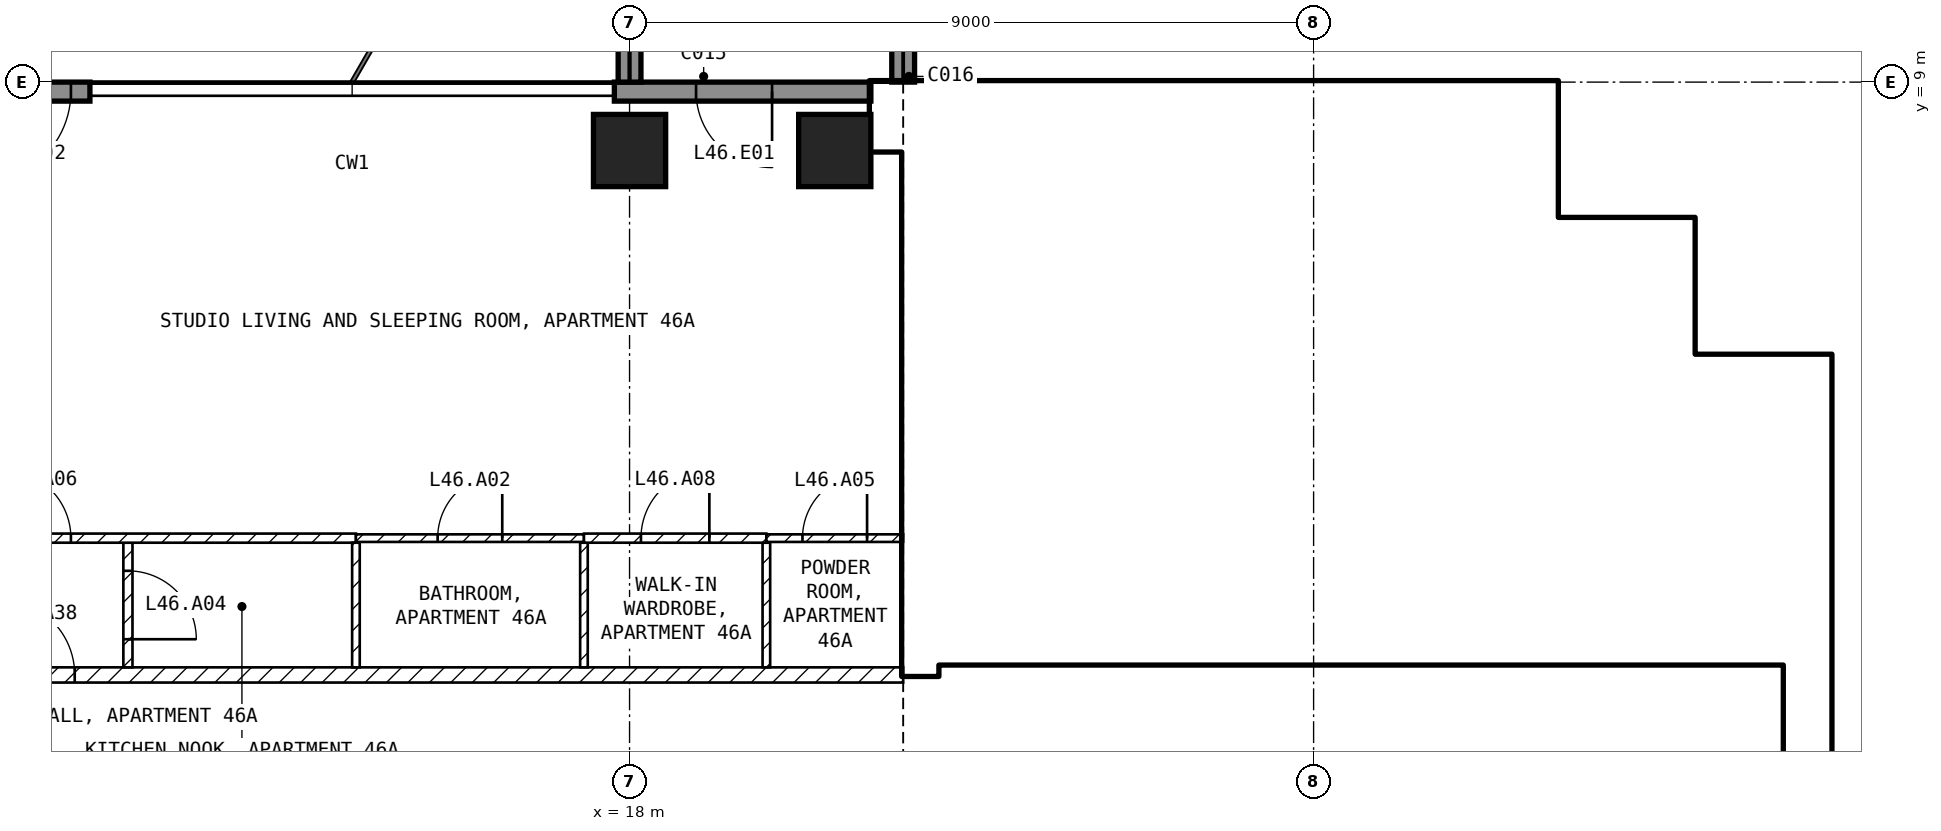
"""IFC4 building model, lengths in metres.
Left out: names, types, materials, properties, quantities, classifications, styles, units other than length and angle.
Written with IfcOpenShell. Run it as: python <this file> out.ifc"""

import sys

from ifc_helpers import new_model, si_unit, direction, frame, frame_2d, origin, origin_2d, place, context, subcontext, project, spatial, rectangle, extrude, element, fill, save


model = new_model("IFC4")
c1 = context("Model", 3, precision=1e-05, world=origin(), true_north=direction((0.0, 1.0)))
c2 = subcontext(c1, "Body", "Model", "MODEL_VIEW")
j1 = project(units=[si_unit("LENGTHUNIT", "METRE"), si_unit("PLANEANGLEUNIT", "RADIAN")], contexts=[c1])
p1 = place(None, origin())
s1 = spatial("IfcSite", under=j1, at=p1, CompositionType="ELEMENT")
p2 = place(p1, origin())
s2 = spatial("IfcBuilding", under=s1, at=p2, CompositionType="ELEMENT")
p3 = place(p2, frame((0.0, 0.0, 187.6)))
s3 = spatial("IfcBuildingStorey", under=s2, at=p3, CompositionType="ELEMENT", Elevation=187.6)
for number, where, z_axis, x_axis in (
    (1, (18.0, 8.1, -0.25), (0.0, 0.0, 1.0), (1.0, 0.0, 0.0)),
    (2, (20.7, 8.1, -0.25), (0.0, 0.0, 1.0), (1.0, 0.0, 0.0)),
):
    element("IfcColumn", number, at=place(p3, frame(where, z_axis=z_axis, x_axis=x_axis)), inside=s3, PredefinedType="COLUMN", context=c2, shape_type="SweptSolid", body=[
        extrude(rectangle(XDim=0.95, YDim=0.95, at=origin_2d()), origin(), (0.0, 0.0, 1.0), 3.5),
    ])
p4 = place(p3, frame((21.175, 8.875, 0.0), z_axis=(0.0, 0.0, 1.0), x_axis=(-1.0, 0.0, 0.0)))
e3 = element("IfcWall", 3, at=p4, inside=s3, PredefinedType="SOLIDWALL", context=c2, shape_type="SweptSolid", body=[
    extrude(rectangle(XDim=3.375, YDim=0.25, at=frame_2d((1.688, 0.0))), origin(), (0.0, 0.0, 1.0), 3.25),
])
p5 = place(p4, frame((1.3, 0.0, 0.0)))
e4 = element("IfcOpeningElement", 4, at=p5, cuts=e3, PredefinedType="OPENING", context=c2, shape_type="SweptSolid", body=[
    extrude(rectangle(XDim=1.0, YDim=2.4, at=frame_2d((0.5, 1.2))), frame((0.0, 0.135, 0.0), z_axis=(0.0, -1.0, 0.0), x_axis=(1.0, 0.0, 0.0)), (0.0, 0.0, 1.0), 0.27),
])
p6 = place(p3, frame((10.9, 8.875, 0.0), z_axis=(0.0, 0.0, 1.0), x_axis=(-1.0, 0.0, 0.0)))
e5 = element("IfcWall", 5, at=p6, inside=s3, PredefinedType="SOLIDWALL", context=c2, shape_type="SweptSolid", body=[
    extrude(rectangle(XDim=1.84, YDim=0.25, at=frame_2d((0.92, 0.0))), origin(), (0.0, 0.0, 1.0), 3.25),
])
p7 = place(p6, frame((0.25, 0.0, 0.0)))
e6 = element("IfcOpeningElement", 6, at=p7, cuts=e5, PredefinedType="OPENING", context=c2, shape_type="SweptSolid", body=[
    extrude(rectangle(XDim=1.2, YDim=2.4, at=frame_2d((0.6, 1.2))), frame((0.0, 0.135, 0.0), z_axis=(0.0, -1.0, 0.0), x_axis=(1.0, 0.0, 0.0)), (0.0, 0.0, 1.0), 0.27),
])
for number, where, z_axis, x_axis in (
    (7, (18.0, 9.0, 0.0), (0.0, 0.0, 1.0), (0.0, 1.0, 0.0)),
    (8, (21.6, 9.0, 0.0), (0.0, 0.0, 1.0), (0.0, 1.0, 0.0)),
):
    element("IfcWall", number, at=place(p3, frame(where, z_axis=z_axis, x_axis=x_axis)), inside=s3, PredefinedType="SOLIDWALL", context=c2, shape_type="SweptSolid", body=[
        extrude(rectangle(XDim=2.7, YDim=0.3, at=frame_2d((1.35, 0.0))), origin(), (0.0, 0.0, 1.0), 3.25),
    ])
p8 = place(p3, frame((33.5, -4.8, 0.0), z_axis=(0.0, 0.0, 1.0), x_axis=(0.0, 1.0, 0.0)))
e9 = element("IfcWall", 9, at=p8, inside=s3, PredefinedType="SHEAR", context=c2, shape_type="SweptSolid", body=[
    extrude(rectangle(XDim=10.2, YDim=0.6, at=frame_2d((5.1, 0.0))), origin(), (0.0, 0.0, 1.0), 3.25),
])
for number, where, z_axis, x_axis in (
    (10, (31.4, 5.1, 0.0), (0.0, 0.0, 1.0), (1.0, 0.0, 0.0)),
    (11, (31.7, 5.4, 0.0), (0.0, 0.0, 1.0), (0.0, 1.0, 0.0)),
):
    element("IfcWall", number, at=place(p3, frame(where, z_axis=z_axis, x_axis=x_axis)), inside=s3, PredefinedType="SHEAR", context=c2, shape_type="SweptSolid", body=[
        extrude(rectangle(XDim=1.8, YDim=0.6, at=frame_2d((0.9, 0.0))), origin(), (0.0, 0.0, 1.0), 3.25),
    ])
p9 = place(p3, frame((29.6, 6.9, 0.0), z_axis=(0.0, 0.0, 1.0), x_axis=(1.0, 0.0, 0.0)))
e12 = element("IfcWall", 12, at=p9, inside=s3, PredefinedType="SHEAR", context=c2, shape_type="SweptSolid", body=[
    extrude(rectangle(XDim=1.8, YDim=0.6, at=frame_2d((0.9, 0.0))), origin(), (0.0, 0.0, 1.0), 3.25),
])
p10 = place(p3, frame((29.9, 7.2, 0.0), z_axis=(0.0, 0.0, 1.0), x_axis=(0.0, 1.0, 0.0)))
e13 = element("IfcWall", 13, at=p10, inside=s3, PredefinedType="SHEAR", context=c2, shape_type="SweptSolid", body=[
    extrude(rectangle(XDim=1.8, YDim=0.6, at=frame_2d((0.9, 0.0))), origin(), (0.0, 0.0, 1.0), 3.25),
])
p11 = place(p3, frame((21.175, 8.55, 0.0), z_axis=(0.0, 0.0, 1.0), x_axis=(1.0, 0.0, 0.0)))
e14 = element("IfcWall", 14, at=p11, inside=s3, PredefinedType="SHEAR", context=c2, shape_type="SweptSolid", body=[
    extrude(rectangle(XDim=8.425, YDim=0.9, at=frame_2d((4.212, 0.0))), origin(), (0.0, 0.0, 1.0), 3.25),
])
p12 = place(p3, frame((21.825, 1.2, 0.0), z_axis=(0.0, 0.0, 1.0), x_axis=(0.0, 1.0, 0.0)))
e15 = element("IfcWall", 15, at=p12, inside=s3, PredefinedType="SHEAR", context=c2, shape_type="SweptSolid", body=[
    extrude(rectangle(XDim=6.9, YDim=0.45, at=frame_2d((3.45, 0.0))), origin(), (0.0, 0.0, 1.0), 3.25),
])
p13 = place(p3, frame((22.05, 1.45, 0.0), z_axis=(0.0, 0.0, 1.0), x_axis=(1.0, 0.0, 0.0)))
e16 = element("IfcWall", 16, at=p13, inside=s3, PredefinedType="SOLIDWALL", context=c2, shape_type="SweptSolid", body=[
    extrude(rectangle(XDim=11.15, YDim=0.2, at=frame_2d((5.575, 0.0))), origin(), (0.0, 0.0, 1.0), 3.25),
])
p14 = place(p13, frame((0.75, 0.0, 0.0)))
e17 = element("IfcOpeningElement", 17, at=p14, cuts=e16, PredefinedType="OPENING", context=c2, shape_type="SweptSolid", body=[
    extrude(rectangle(XDim=1.0, YDim=2.1, at=frame_2d((0.5, 1.05))), frame((0.0, 0.11, 0.0), z_axis=(0.0, -1.0, 0.0), x_axis=(1.0, 0.0, 0.0)), (0.0, 0.0, 1.0), 0.22),
])
p15 = place(p13, frame((3.25, 0.0, 0.0)))
e18 = element("IfcOpeningElement", 18, at=p15, cuts=e16, PredefinedType="OPENING", context=c2, shape_type="SweptSolid", body=[
    extrude(rectangle(XDim=1.0, YDim=2.1, at=frame_2d((0.5, 1.05))), frame((0.0, 0.11, 0.0), z_axis=(0.0, -1.0, 0.0), x_axis=(1.0, 0.0, 0.0)), (0.0, 0.0, 1.0), 0.22),
])
p16 = place(p13, frame((9.15, 0.0, 0.0)))
e19 = element("IfcOpeningElement", 19, at=p16, cuts=e16, PredefinedType="OPENING", context=c2, shape_type="SweptSolid", body=[
    extrude(rectangle(XDim=0.9, YDim=2.1, at=frame_2d((0.45, 1.05))), frame((0.0, 0.11, 0.0), z_axis=(0.0, -1.0, 0.0), x_axis=(1.0, 0.0, 0.0)), (0.0, 0.0, 1.0), 0.22),
])
p17 = place(p3, frame((22.05, 5.15, 0.0), z_axis=(0.0, 0.0, 1.0), x_axis=(1.0, 0.0, 0.0)))
e20 = element("IfcWall", 20, at=p17, inside=s3, PredefinedType="SOLIDWALL", context=c2, shape_type="SweptSolid", body=[
    extrude(rectangle(XDim=6.3, YDim=0.2, at=frame_2d((3.15, 0.0))), origin(), (0.0, 0.0, 1.0), 3.25),
])
p18 = place(p17, frame((0.2, 0.0, 0.0)))
e21 = element("IfcOpeningElement", 21, at=p18, cuts=e20, PredefinedType="OPENING", context=c2, shape_type="SweptSolid", body=[
    extrude(rectangle(XDim=1.0, YDim=2.1, at=frame_2d((0.5, 1.05))), frame((0.0, 0.11, 0.0), z_axis=(0.0, -1.0, 0.0), x_axis=(1.0, 0.0, 0.0)), (0.0, 0.0, 1.0), 0.22),
])
p19 = place(p3, frame((28.25, 5.25, 0.0), z_axis=(0.0, 0.0, 1.0), x_axis=(0.0, 1.0, 0.0)))
e22 = element("IfcWall", 22, at=p19, inside=s3, PredefinedType="SOLIDWALL", context=c2, shape_type="SweptSolid", body=[
    extrude(rectangle(XDim=2.85, YDim=0.2, at=frame_2d((1.425, 0.0))), origin(), (0.0, 0.0, 1.0), 3.25),
])
p20 = place(p3, frame((27.2, 3.95, 0.0), z_axis=(0.0, 0.0, 1.0), x_axis=(1.0, 0.0, 0.0)))
e23 = element("IfcWall", 23, at=p20, inside=s3, PredefinedType="SOLIDWALL", context=c2, shape_type="SweptSolid", body=[
    extrude(rectangle(XDim=6.0, YDim=0.2, at=frame_2d((3.0, 0.0))), origin(), (0.0, 0.0, 1.0), 3.25),
])
p21 = place(p3, frame((27.1, 1.55, 0.0), z_axis=(0.0, 0.0, 1.0), x_axis=(0.0, 1.0, 0.0)))
e24 = element("IfcWall", 24, at=p21, inside=s3, PredefinedType="SOLIDWALL", context=c2, shape_type="SweptSolid", body=[
    extrude(rectangle(XDim=3.5, YDim=0.2, at=frame_2d((1.75, 0.0))), origin(), (0.0, 0.0, 1.0), 3.25),
])
p22 = place(p21, frame((0.6, 0.0, 0.0)))
e25 = element("IfcOpeningElement", 25, at=p22, cuts=e24, PredefinedType="OPENING", context=c2, shape_type="SweptSolid", body=[
    extrude(rectangle(XDim=1.1, YDim=2.1, at=frame_2d((0.55, 1.05))), frame((0.0, 0.11, 0.0), z_axis=(0.0, -1.0, 0.0), x_axis=(1.0, 0.0, 0.0)), (0.0, 0.0, 1.0), 0.22),
])
p23 = place(p21, frame((2.6, 0.0, 0.0)))
e26 = element("IfcOpeningElement", 26, at=p23, cuts=e24, PredefinedType="OPENING", context=c2, shape_type="SweptSolid", body=[
    extrude(rectangle(XDim=0.8, YDim=2.1, at=frame_2d((0.4, 1.05))), frame((0.0, 0.11, 0.0), z_axis=(0.0, -1.0, 0.0), x_axis=(1.0, 0.0, 0.0)), (0.0, 0.0, 1.0), 0.22),
])
p24 = place(p3, frame((30.0, 1.55, 0.0), z_axis=(0.0, 0.0, 1.0), x_axis=(0.0, 1.0, 0.0)))
e27 = element("IfcWall", 27, at=p24, inside=s3, PredefinedType="SOLIDWALL", context=c2, shape_type="SweptSolid", body=[
    extrude(rectangle(XDim=2.3, YDim=0.2, at=frame_2d((1.15, 0.0))), origin(), (0.0, 0.0, 1.0), 3.25),
])
p25 = place(p3, frame((4.4, 1.2, 0.0), z_axis=(0.0, 0.0, 1.0), x_axis=(1.0, 0.0, 0.0)))
e28 = element("IfcWall", 28, at=p25, inside=s3, PredefinedType="PARTITIONING", context=c2, shape_type="SweptSolid", body=[
    extrude(rectangle(XDim=17.2, YDim=0.2, at=frame_2d((8.6, 0.0))), origin(), (0.0, 0.0, 1.0), 3.25),
])
p26 = place(p25, frame((5.3, 0.0, 0.0)))
e29 = element("IfcOpeningElement", 29, at=p26, cuts=e28, PredefinedType="OPENING", context=c2, shape_type="SweptSolid", body=[
    extrude(rectangle(XDim=1.0, YDim=2.1, at=frame_2d((0.5, 1.05))), frame((0.0, 0.11, 0.0), z_axis=(0.0, -1.0, 0.0), x_axis=(1.0, 0.0, 0.0)), (0.0, 0.0, 1.0), 0.22),
])
p27 = place(p3, frame((11.4, 2.94, 0.0), z_axis=(0.0, 0.0, 1.0), x_axis=(0.0, -1.0, 0.0)))
e30 = element("IfcWall", 30, at=p27, inside=s3, PredefinedType="PARTITIONING", context=c2, shape_type="SweptSolid", body=[
    extrude(rectangle(XDim=1.64, YDim=0.12, at=frame_2d((0.82, 0.0))), origin(), (0.0, 0.0, 1.0), 3.25),
])
p28 = place(p27, frame((0.37, 0.0, 0.0)))
e31 = element("IfcOpeningElement", 31, at=p28, cuts=e30, PredefinedType="OPENING", context=c2, shape_type="SweptSolid", body=[
    extrude(rectangle(XDim=0.9, YDim=2.1, at=frame_2d((0.45, 1.05))), frame((0.0, 0.07, 0.0), z_axis=(0.0, -1.0, 0.0), x_axis=(1.0, 0.0, 0.0)), (0.0, 0.0, 1.0), 0.14),
])
p29 = place(p3, frame((8.94, 3.0, 0.0), z_axis=(0.0, 0.0, 1.0), x_axis=(1.0, 0.0, 0.0)))
e32 = element("IfcWall", 32, at=p29, inside=s3, PredefinedType="PARTITIONING", context=c2, shape_type="SweptSolid", body=[
    extrude(rectangle(XDim=5.46, YDim=0.12, at=frame_2d((2.73, 0.0))), origin(), (0.0, 0.0, 1.0), 3.25),
])
p30 = place(p29, frame((0.81, 0.0, 0.0)))
e33 = element("IfcOpeningElement", 33, at=p30, cuts=e32, PredefinedType="OPENING", context=c2, shape_type="SweptSolid", body=[
    extrude(rectangle(XDim=0.9, YDim=2.1, at=frame_2d((0.45, 1.05))), frame((0.0, 0.07, 0.0), z_axis=(0.0, -1.0, 0.0), x_axis=(1.0, 0.0, 0.0)), (0.0, 0.0, 1.0), 0.14),
])
for number, where, z_axis, x_axis in (
    (34, (14.4, 2.94, 0.0), (0.0, 0.0, 1.0), (0.0, -1.0, 0.0)),
    (35, (17.4, 2.94, 0.0), (0.0, 0.0, 1.0), (0.0, -1.0, 0.0)),
):
    element("IfcWall", number, at=place(p3, frame(where, z_axis=z_axis, x_axis=x_axis)), inside=s3, PredefinedType="PARTITIONING", context=c2, shape_type="SweptSolid", body=[
        extrude(rectangle(XDim=1.64, YDim=0.1, at=frame_2d((0.82, 0.0))), origin(), (0.0, 0.0, 1.0), 3.25),
    ])
p31 = place(p3, frame((14.4, 3.0, 0.0), z_axis=(0.0, 0.0, 1.0), x_axis=(1.0, 0.0, 0.0)))
e36 = element("IfcWall", 36, at=p31, inside=s3, PredefinedType="PARTITIONING", context=c2, shape_type="SweptSolid", body=[
    extrude(rectangle(XDim=3.0, YDim=0.1, at=frame_2d((1.5, 0.0))), origin(), (0.0, 0.0, 1.0), 3.25),
])
p32 = place(p31, frame((1.075, 0.0, 0.0)))
e37 = element("IfcOpeningElement", 37, at=p32, cuts=e36, PredefinedType="OPENING", context=c2, shape_type="SweptSolid", body=[
    extrude(rectangle(XDim=0.85, YDim=2.1, at=frame_2d((0.425, 1.05))), frame((0.0, 0.06, 0.0), z_axis=(0.0, -1.0, 0.0), x_axis=(1.0, 0.0, 0.0)), (0.0, 0.0, 1.0), 0.12),
])
p33 = place(p3, frame((19.8, 2.94, 0.0), z_axis=(0.0, 0.0, 1.0), x_axis=(0.0, -1.0, 0.0)))
e38 = element("IfcWall", 38, at=p33, inside=s3, PredefinedType="PARTITIONING", context=c2, shape_type="SweptSolid", body=[
    extrude(rectangle(XDim=1.64, YDim=0.1, at=frame_2d((0.82, 0.0))), origin(), (0.0, 0.0, 1.0), 3.25),
])
p34 = place(p3, frame((17.4, 3.0, 0.0), z_axis=(0.0, 0.0, 1.0), x_axis=(1.0, 0.0, 0.0)))
e39 = element("IfcWall", 39, at=p34, inside=s3, PredefinedType="PARTITIONING", context=c2, shape_type="SweptSolid", body=[
    extrude(rectangle(XDim=2.4, YDim=0.12, at=frame_2d((1.2, 0.0))), origin(), (0.0, 0.0, 1.0), 3.25),
])
p35 = place(p34, frame((0.75, 0.0, 0.0)))
e40 = element("IfcOpeningElement", 40, at=p35, cuts=e39, PredefinedType="OPENING", context=c2, shape_type="SweptSolid", body=[
    extrude(rectangle(XDim=0.9, YDim=2.1, at=frame_2d((0.45, 1.05))), frame((0.0, 0.07, 0.0), z_axis=(0.0, -1.0, 0.0), x_axis=(1.0, 0.0, 0.0)), (0.0, 0.0, 1.0), 0.14),
])
p36 = place(p3, frame((19.8, 3.0, 0.0), z_axis=(0.0, 0.0, 1.0), x_axis=(1.0, 0.0, 0.0)))
e41 = element("IfcWall", 41, at=p36, inside=s3, PredefinedType="PARTITIONING", context=c2, shape_type="SweptSolid", body=[
    extrude(rectangle(XDim=1.8, YDim=0.1, at=frame_2d((0.9, 0.0))), origin(), (0.0, 0.0, 1.0), 3.25),
])
p37 = place(p36, frame((0.475, 0.0, 0.0)))
e42 = element("IfcOpeningElement", 42, at=p37, cuts=e41, PredefinedType="OPENING", context=c2, shape_type="SweptSolid", body=[
    extrude(rectangle(XDim=0.85, YDim=2.1, at=frame_2d((0.425, 1.05))), frame((0.0, 0.06, 0.0), z_axis=(0.0, -1.0, 0.0), x_axis=(1.0, 0.0, 0.0)), (0.0, 0.0, 1.0), 0.12),
])
p38 = place(p5, origin())
e43 = element("IfcDoor", 43, at=p38, inside=s3, OperationType="SINGLE_SWING_LEFT", PredefinedType="DOOR", context=c2, shape_type="SweptSolid", body=[
    extrude(rectangle(XDim=1.0, YDim=2.4, at=frame_2d((0.5, 1.2))), frame((0.0, 0.025, 0.0), z_axis=(0.0, -1.0, 0.0), x_axis=(1.0, 0.0, 0.0)), (0.0, 0.0, 1.0), 0.05),
])
fill(e4, e43)
p39 = place(p7, origin())
e44 = element("IfcDoor", 44, at=p39, inside=s3, OperationType="SINGLE_SWING_RIGHT", PredefinedType="DOOR", context=c2, shape_type="SweptSolid", body=[
    extrude(rectangle(XDim=1.2, YDim=2.4, at=frame_2d((0.6, 1.2))), frame((0.0, 0.025, 0.0), z_axis=(0.0, -1.0, 0.0), x_axis=(1.0, 0.0, 0.0)), (0.0, 0.0, 1.0), 0.05),
])
fill(e6, e44)
p40 = place(p22, origin())
e45 = element("IfcDoor", 45, at=p40, inside=s3, OperationType="DOUBLE_DOOR_SLIDING", PredefinedType="DOOR", context=c2, shape_type="SweptSolid", body=[
    extrude(rectangle(XDim=1.1, YDim=2.1, at=frame_2d((0.55, 1.05))), frame((0.0, 0.025, 0.0), z_axis=(0.0, -1.0, 0.0), x_axis=(1.0, 0.0, 0.0)), (0.0, 0.0, 1.0), 0.05),
])
fill(e25, e45)
p41 = place(p18, origin())
e46 = element("IfcDoor", 46, at=p41, inside=s3, OperationType="SINGLE_SWING_LEFT", PredefinedType="DOOR", context=c2, shape_type="SweptSolid", body=[
    extrude(rectangle(XDim=1.0, YDim=2.1, at=frame_2d((0.5, 1.05))), frame((0.0, 0.025, 0.0), z_axis=(0.0, -1.0, 0.0), x_axis=(1.0, 0.0, 0.0)), (0.0, 0.0, 1.0), 0.05),
])
fill(e21, e46)
p42 = place(p14, origin())
e47 = element("IfcDoor", 47, at=p42, inside=s3, OperationType="SINGLE_SWING_LEFT", PredefinedType="DOOR", context=c2, shape_type="SweptSolid", body=[
    extrude(rectangle(XDim=1.0, YDim=2.1, at=frame_2d((0.5, 1.05))), frame((0.0, 0.025, 0.0), z_axis=(0.0, -1.0, 0.0), x_axis=(1.0, 0.0, 0.0)), (0.0, 0.0, 1.0), 0.05),
])
fill(e17, e47)
p43 = place(p15, origin())
e48 = element("IfcDoor", 48, at=p43, inside=s3, OperationType="SINGLE_SWING_LEFT", PredefinedType="DOOR", context=c2, shape_type="SweptSolid", body=[
    extrude(rectangle(XDim=1.0, YDim=2.1, at=frame_2d((0.5, 1.05))), frame((0.0, 0.025, 0.0), z_axis=(0.0, -1.0, 0.0), x_axis=(1.0, 0.0, 0.0)), (0.0, 0.0, 1.0), 0.05),
])
fill(e18, e48)
p44 = place(p23, origin())
e49 = element("IfcDoor", 49, at=p44, inside=s3, OperationType="SINGLE_SWING_LEFT", PredefinedType="DOOR", context=c2, shape_type="SweptSolid", body=[
    extrude(rectangle(XDim=0.8, YDim=2.1, at=frame_2d((0.4, 1.05))), frame((0.0, 0.025, 0.0), z_axis=(0.0, -1.0, 0.0), x_axis=(1.0, 0.0, 0.0)), (0.0, 0.0, 1.0), 0.05),
])
fill(e26, e49)
p45 = place(p16, origin())
e50 = element("IfcDoor", 50, at=p45, inside=s3, OperationType="SINGLE_SWING_LEFT", PredefinedType="DOOR", context=c2, shape_type="SweptSolid", body=[
    extrude(rectangle(XDim=0.9, YDim=2.1, at=frame_2d((0.45, 1.05))), frame((0.0, 0.025, 0.0), z_axis=(0.0, -1.0, 0.0), x_axis=(1.0, 0.0, 0.0)), (0.0, 0.0, 1.0), 0.05),
])
fill(e19, e50)
p46 = place(p32, origin())
e51 = element("IfcDoor", 51, at=p46, inside=s3, OperationType="SINGLE_SWING_RIGHT", PredefinedType="DOOR", context=c2, shape_type="SweptSolid", body=[
    extrude(rectangle(XDim=0.85, YDim=2.1, at=frame_2d((0.425, 1.05))), frame((0.0, 0.025, 0.0), z_axis=(0.0, -1.0, 0.0), x_axis=(1.0, 0.0, 0.0)), (0.0, 0.0, 1.0), 0.05),
])
fill(e37, e51)
p47 = place(p28, origin())
e52 = element("IfcDoor", 52, at=p47, inside=s3, OperationType="SINGLE_SWING_RIGHT", PredefinedType="DOOR", context=c2, shape_type="SweptSolid", body=[
    extrude(rectangle(XDim=0.9, YDim=2.1, at=frame_2d((0.45, 1.05))), frame((0.0, 0.025, 0.0), z_axis=(0.0, -1.0, 0.0), x_axis=(1.0, 0.0, 0.0)), (0.0, 0.0, 1.0), 0.05),
])
fill(e31, e52)
p48 = place(p37, origin())
e53 = element("IfcDoor", 53, at=p48, inside=s3, OperationType="SINGLE_SWING_RIGHT", PredefinedType="DOOR", context=c2, shape_type="SweptSolid", body=[
    extrude(rectangle(XDim=0.85, YDim=2.1, at=frame_2d((0.425, 1.05))), frame((0.0, 0.025, 0.0), z_axis=(0.0, -1.0, 0.0), x_axis=(1.0, 0.0, 0.0)), (0.0, 0.0, 1.0), 0.05),
])
fill(e42, e53)
p49 = place(p30, origin())
e54 = element("IfcDoor", 54, at=p49, inside=s3, OperationType="SINGLE_SWING_LEFT", PredefinedType="DOOR", context=c2, shape_type="SweptSolid", body=[
    extrude(rectangle(XDim=0.9, YDim=2.1, at=frame_2d((0.45, 1.05))), frame((0.0, 0.025, 0.0), z_axis=(0.0, -1.0, 0.0), x_axis=(1.0, 0.0, 0.0)), (0.0, 0.0, 1.0), 0.05),
])
fill(e33, e54)
p50 = place(p35, origin())
e55 = element("IfcDoor", 55, at=p50, inside=s3, OperationType="SINGLE_SWING_RIGHT", PredefinedType="DOOR", context=c2, shape_type="SweptSolid", body=[
    extrude(rectangle(XDim=0.9, YDim=2.1, at=frame_2d((0.45, 1.05))), frame((0.0, 0.025, 0.0), z_axis=(0.0, -1.0, 0.0), x_axis=(1.0, 0.0, 0.0)), (0.0, 0.0, 1.0), 0.05),
])
fill(e40, e55)
p51 = place(p26, origin())
e56 = element("IfcDoor", 56, at=p51, inside=s3, OperationType="SINGLE_SWING_LEFT", PredefinedType="DOOR", context=c2, shape_type="SweptSolid", body=[
    extrude(rectangle(XDim=1.0, YDim=2.1, at=frame_2d((0.5, 1.05))), frame((0.0, 0.025, 0.0), z_axis=(0.0, -1.0, 0.0), x_axis=(1.0, 0.0, 0.0)), (0.0, 0.0, 1.0), 0.05),
])
fill(e29, e56)
save(model, sys.argv[1])
